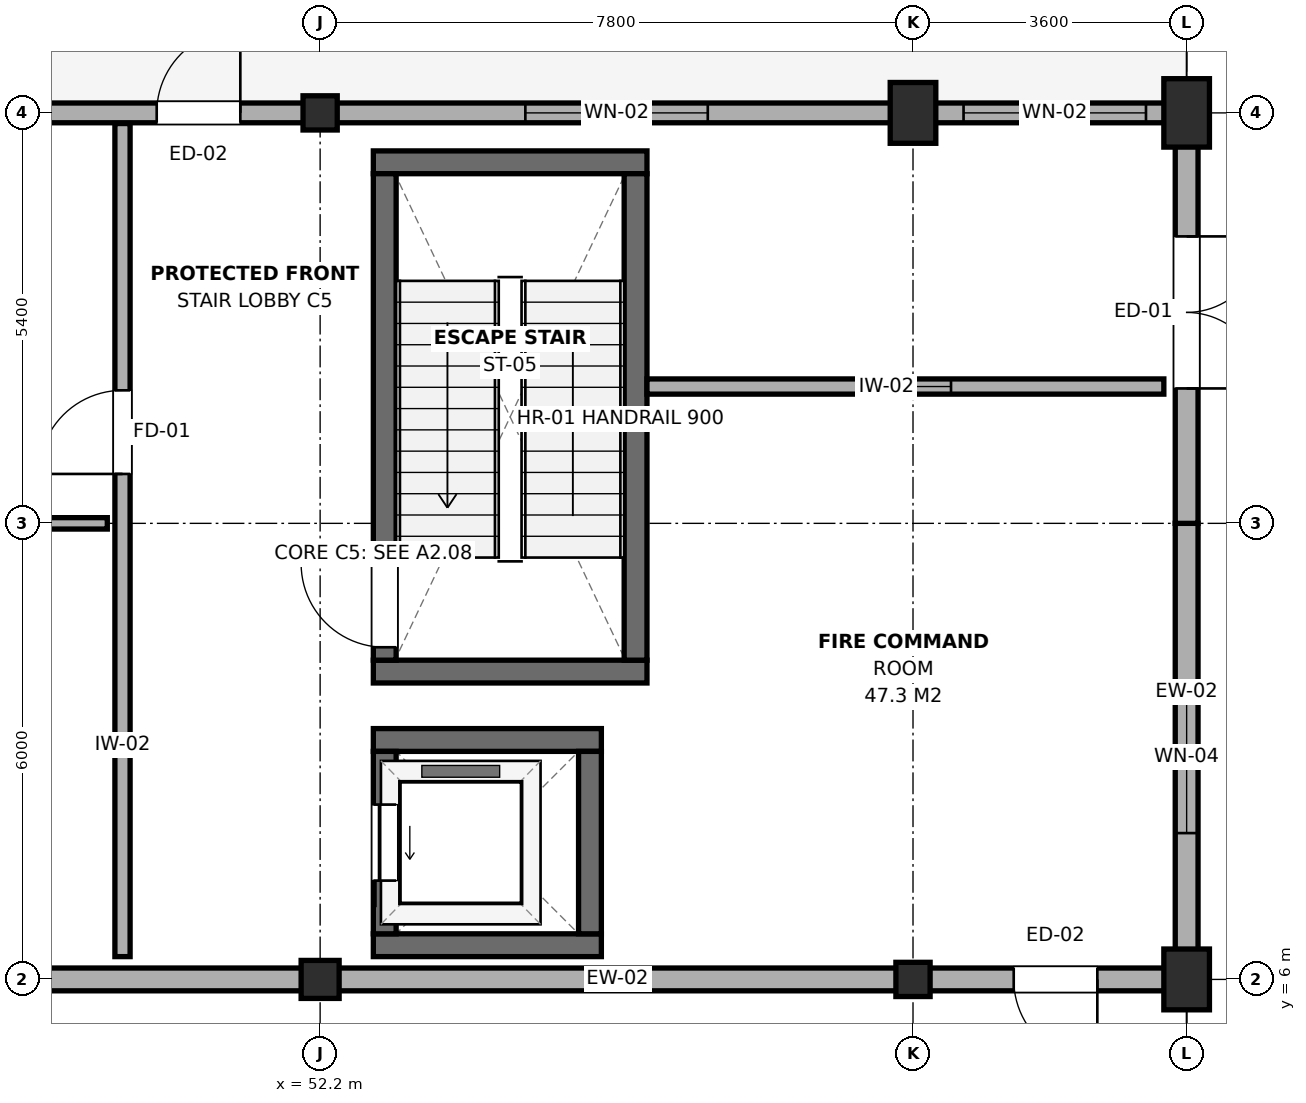
"""IFC4 building model, lengths in metres.
Left out: names, types, materials, properties, quantities, classifications, styles, units other than length and angle.
Written with IfcOpenShell. Run it as: python <this file> out.ifc"""

import sys

from ifc_helpers import new_model, si_unit, direction, frame, frame_2d, origin, origin_2d, place, context, subcontext, project, spatial, rectangle, extrude, element, fill, save


model = new_model("IFC4")
c1 = context("Model", 3, precision=1e-05, world=origin(), true_north=direction((0.0, 1.0)))
c2 = subcontext(c1, "Body", "Model", "MODEL_VIEW")
j1 = project(units=[si_unit("LENGTHUNIT", "METRE"), si_unit("PLANEANGLEUNIT", "RADIAN")], contexts=[c1])
p1 = place(None, origin())
s1 = spatial("IfcSite", under=j1, at=p1, CompositionType="ELEMENT")
p2 = place(p1, origin())
s2 = spatial("IfcBuilding", under=s1, at=p2, CompositionType="ELEMENT")
p3 = place(p2, origin())
s3 = spatial("IfcBuildingStorey", under=s2, at=p3, CompositionType="ELEMENT", Elevation=0.0)
p4 = place(p3, frame((52.2, 6.0, 0.0), z_axis=(0.0, 0.0, 1.0), x_axis=(1.0, 0.0, 0.0)))
e1 = element("IfcColumn", 1, at=p4, inside=s3, PredefinedType="COLUMN", context=c2, shape_type="SweptSolid", body=[
    extrude(rectangle(XDim=0.5, YDim=0.5, at=origin_2d()), origin(), (0.0, 0.0, 1.0), 4.8),
])
for number, where, z_axis, x_axis in (
    (2, (52.2, 17.4, 0.0), (0.0, 0.0, 1.0), (1.0, 0.0, 0.0)),
    (3, (60.0, 6.0, 0.0), (0.0, 0.0, 1.0), (1.0, 0.0, 0.0)),
):
    element("IfcColumn", number, at=place(p3, frame(where, z_axis=z_axis, x_axis=x_axis)), inside=s3, PredefinedType="COLUMN", context=c2, shape_type="SweptSolid", body=[
        extrude(rectangle(XDim=0.45, YDim=0.45, at=origin_2d()), origin(), (0.0, 0.0, 1.0), 4.8),
    ])
for number, where, z_axis, x_axis in (
    (4, (60.0, 17.4, 0.0), (0.0, 0.0, 1.0), (1.0, 0.0, 0.0)),
    (5, (63.6, 6.0, 0.0), (0.0, 0.0, 1.0), (1.0, 0.0, 0.0)),
):
    element("IfcColumn", number, at=place(p3, frame(where, z_axis=z_axis, x_axis=x_axis)), inside=s3, PredefinedType="COLUMN", context=c2, shape_type="SweptSolid", body=[
        extrude(rectangle(XDim=0.6, YDim=0.8, at=origin_2d()), origin(), (0.0, 0.0, 1.0), 4.8),
    ])
p5 = place(p3, frame((63.6, 17.4, 0.0), z_axis=(0.0, 0.0, 1.0), x_axis=(1.0, 0.0, 0.0)))
e6 = element("IfcColumn", 6, at=p5, inside=s3, PredefinedType="COLUMN", context=c2, shape_type="SweptSolid", body=[
    extrude(rectangle(XDim=0.6, YDim=0.9, at=origin_2d()), origin(), (0.0, 0.0, 1.0), 4.8),
])
for number, where, z_axis, x_axis in (
    (7, (52.9, 10.05, 0.0), (0.0, 0.0, 1.0), (1.0, 0.0, 0.0)),
    (8, (52.9, 16.75, 0.0), (0.0, 0.0, 1.0), (1.0, 0.0, 0.0)),
):
    element("IfcWall", number, at=place(p3, frame(where, z_axis=z_axis, x_axis=x_axis)), inside=s3, PredefinedType="SHEAR", context=c2, shape_type="SweptSolid", body=[
        extrude(rectangle(XDim=3.6, YDim=0.3, at=frame_2d((1.8, 0.0))), origin(), (0.0, 0.0, 1.0), 4.56),
    ])
p6 = place(p3, frame((53.05, 10.2, 0.0), z_axis=(0.0, 0.0, 1.0), x_axis=(0.0, 1.0, 0.0)))
e9 = element("IfcWall", 9, at=p6, inside=s3, PredefinedType="SHEAR", context=c2, shape_type="SweptSolid", body=[
    extrude(rectangle(XDim=6.4, YDim=0.3, at=frame_2d((3.2, 0.0))), origin(), (0.0, 0.0, 1.0), 4.56),
])
p7 = place(p6, frame((0.17, 0.0, 0.0)))
e10 = element("IfcOpeningElement", 10, at=p7, cuts=e9, PredefinedType="OPENING", context=c2, shape_type="SweptSolid", body=[
    extrude(rectangle(XDim=1.1, YDim=2.15, at=frame_2d((0.55, 1.075))), frame((0.0, 0.165, 0.0), z_axis=(0.0, -1.0, 0.0), x_axis=(1.0, 0.0, 0.0)), (0.0, 0.0, 1.0), 0.33),
])
p8 = place(p3, frame((56.35, 10.2, 0.0), z_axis=(0.0, 0.0, 1.0), x_axis=(0.0, 1.0, 0.0)))
e11 = element("IfcWall", 11, at=p8, inside=s3, PredefinedType="SHEAR", context=c2, shape_type="SweptSolid", body=[
    extrude(rectangle(XDim=6.4, YDim=0.3, at=frame_2d((3.2, 0.0))), origin(), (0.0, 0.0, 1.0), 4.56),
])
for number, where, z_axis, x_axis in (
    (12, (52.9, 6.45, 0.0), (0.0, 0.0, 1.0), (1.0, 0.0, 0.0)),
    (13, (52.9, 9.15, 0.0), (0.0, 0.0, 1.0), (1.0, 0.0, 0.0)),
):
    element("IfcWall", number, at=place(p3, frame(where, z_axis=z_axis, x_axis=x_axis)), inside=s3, PredefinedType="SHEAR", context=c2, shape_type="SweptSolid", body=[
        extrude(rectangle(XDim=3.0, YDim=0.3, at=frame_2d((1.5, 0.0))), origin(), (0.0, 0.0, 1.0), 4.56),
    ])
p9 = place(p3, frame((53.05, 6.6, 0.0), z_axis=(0.0, 0.0, 1.0), x_axis=(0.0, 1.0, 0.0)))
e14 = element("IfcWall", 14, at=p9, inside=s3, PredefinedType="SHEAR", context=c2, shape_type="SweptSolid", body=[
    extrude(rectangle(XDim=2.4, YDim=0.3, at=frame_2d((1.2, 0.0))), origin(), (0.0, 0.0, 1.0), 4.56),
])
p10 = place(p9, frame((0.7, 0.0, 0.0)))
e15 = element("IfcOpeningElement", 15, at=p10, cuts=e14, PredefinedType="OPENING", context=c2, shape_type="SweptSolid", body=[
    extrude(rectangle(XDim=1.0, YDim=2.15, at=frame_2d((0.5, 1.075))), frame((0.0, 0.165, 0.0), z_axis=(0.0, -1.0, 0.0), x_axis=(1.0, 0.0, 0.0)), (0.0, 0.0, 1.0), 0.33),
])
p11 = place(p3, frame((55.75, 6.6, 0.0), z_axis=(0.0, 0.0, 1.0), x_axis=(0.0, 1.0, 0.0)))
e16 = element("IfcWall", 16, at=p11, inside=s3, PredefinedType="SHEAR", context=c2, shape_type="SweptSolid", body=[
    extrude(rectangle(XDim=2.4, YDim=0.3, at=frame_2d((1.2, 0.0))), origin(), (0.0, 0.0, 1.0), 4.56),
])
p12 = place(p3, frame((46.2, 6.0, 0.0), z_axis=(0.0, 0.0, 1.0), x_axis=(1.0, 0.0, 0.0)))
e17 = element("IfcWall", 17, at=p12, inside=s3, PredefinedType="SOLIDWALL", context=c2, shape_type="SweptSolid", body=[
    extrude(rectangle(XDim=6.0, YDim=0.3, at=frame_2d((3.0, 0.0))), origin(), (0.0, 0.0, 1.0), 3.955),
])
p13 = place(p3, frame((52.2, 6.0, 0.0), z_axis=(0.0, 0.0, 1.0), x_axis=(1.0, 0.0, 0.0)))
e18 = element("IfcWall", 18, at=p13, inside=s3, PredefinedType="SOLIDWALL", context=c2, shape_type="SweptSolid", body=[
    extrude(rectangle(XDim=7.8, YDim=0.3, at=frame_2d((3.9, 0.0))), origin(), (0.0, 0.0, 1.0), 3.955),
])
p14 = place(p3, frame((60.0, 6.0, 0.0), z_axis=(0.0, 0.0, 1.0), x_axis=(1.0, 0.0, 0.0)))
e19 = element("IfcWall", 19, at=p14, inside=s3, PredefinedType="SOLIDWALL", context=c2, shape_type="SweptSolid", body=[
    extrude(rectangle(XDim=3.75, YDim=0.3, at=frame_2d((1.875, 0.0))), origin(), (0.0, 0.0, 1.0), 3.955),
])
p15 = place(p14, frame((1.325, 0.0, 0.0)))
e20 = element("IfcOpeningElement", 20, at=p15, cuts=e19, PredefinedType="OPENING", context=c2, shape_type="SweptSolid", body=[
    extrude(rectangle(XDim=1.1, YDim=2.2, at=frame_2d((0.55, 1.1))), frame((0.0, 0.165, 0.0), z_axis=(0.0, -1.0, 0.0), x_axis=(1.0, 0.0, 0.0)), (0.0, 0.0, 1.0), 0.33),
])
p16 = place(p3, frame((63.6, 5.85, 0.0), z_axis=(0.0, 0.0, 1.0), x_axis=(0.0, 1.0, 0.0)))
e21 = element("IfcWall", 21, at=p16, inside=s3, PredefinedType="SOLIDWALL", context=c2, shape_type="SweptSolid", body=[
    extrude(rectangle(XDim=6.15, YDim=0.3, at=frame_2d((3.075, 0.0))), origin(), (0.0, 0.0, 1.0), 3.965),
])
p17 = place(p16, frame((2.075, 0.0, 0.9)))
e22 = element("IfcOpeningElement", 22, at=p17, cuts=e21, PredefinedType="OPENING", context=c2, shape_type="SweptSolid", body=[
    extrude(rectangle(XDim=2.0, YDim=1.8, at=frame_2d((1.0, 0.9))), frame((0.0, 0.165, 0.0), z_axis=(0.0, -1.0, 0.0), x_axis=(1.0, 0.0, 0.0)), (0.0, 0.0, 1.0), 0.33),
])
p18 = place(p3, frame((63.6, 12.0, 0.0), z_axis=(0.0, 0.0, 1.0), x_axis=(0.0, 1.0, 0.0)))
e23 = element("IfcWall", 23, at=p18, inside=s3, PredefinedType="SOLIDWALL", context=c2, shape_type="SweptSolid", body=[
    extrude(rectangle(XDim=5.55, YDim=0.3, at=frame_2d((2.775, 0.0))), origin(), (0.0, 0.0, 1.0), 3.965),
])
p19 = place(p18, frame((1.775, 0.0, 0.0)))
e24 = element("IfcOpeningElement", 24, at=p19, cuts=e23, PredefinedType="OPENING", context=c2, shape_type="SweptSolid", body=[
    extrude(rectangle(XDim=2.0, YDim=2.25, at=frame_2d((1.0, 1.125))), frame((0.0, 0.165, 0.0), z_axis=(0.0, -1.0, 0.0), x_axis=(1.0, 0.0, 0.0)), (0.0, 0.0, 1.0), 0.33),
])
p20 = place(p3, frame((46.2, 17.4, 0.0), z_axis=(0.0, 0.0, 1.0), x_axis=(1.0, 0.0, 0.0)))
e25 = element("IfcWall", 25, at=p20, inside=s3, PredefinedType="SOLIDWALL", context=c2, shape_type="SweptSolid", body=[
    extrude(rectangle(XDim=6.0, YDim=0.26, at=frame_2d((3.0, 0.0))), origin(), (0.0, 0.0, 1.0), 4.105),
])
p21 = place(p20, frame((3.85, 0.0, 0.0)))
e26 = element("IfcOpeningElement", 26, at=p21, cuts=e25, PredefinedType="OPENING", context=c2, shape_type="SweptSolid", body=[
    extrude(rectangle(XDim=1.1, YDim=2.2, at=frame_2d((0.55, 1.1))), frame((0.0, 0.145, 0.0), z_axis=(0.0, -1.0, 0.0), x_axis=(1.0, 0.0, 0.0)), (0.0, 0.0, 1.0), 0.29),
])
p22 = place(p3, frame((52.2, 17.4, 0.0), z_axis=(0.0, 0.0, 1.0), x_axis=(1.0, 0.0, 0.0)))
e27 = element("IfcWall", 27, at=p22, inside=s3, PredefinedType="SOLIDWALL", context=c2, shape_type="SweptSolid", body=[
    extrude(rectangle(XDim=7.8, YDim=0.26, at=frame_2d((3.9, 0.0))), origin(), (0.0, 0.0, 1.0), 4.105),
])
p23 = place(p22, frame((2.7, 0.0, 0.9)))
e28 = element("IfcOpeningElement", 28, at=p23, cuts=e27, PredefinedType="OPENING", context=c2, shape_type="SweptSolid", body=[
    extrude(rectangle(XDim=2.4, YDim=2.1, at=frame_2d((1.2, 1.05))), frame((0.0, 0.145, 0.0), z_axis=(0.0, -1.0, 0.0), x_axis=(1.0, 0.0, 0.0)), (0.0, 0.0, 1.0), 0.29),
])
p24 = place(p3, frame((60.0, 17.4, 0.0), z_axis=(0.0, 0.0, 1.0), x_axis=(1.0, 0.0, 0.0)))
e29 = element("IfcWall", 29, at=p24, inside=s3, PredefinedType="SOLIDWALL", context=c2, shape_type="SweptSolid", body=[
    extrude(rectangle(XDim=3.73, YDim=0.26, at=frame_2d((1.865, 0.0))), origin(), (0.0, 0.0, 1.0), 4.205),
])
p25 = place(p24, frame((0.665, 0.0, 0.9)))
e30 = element("IfcOpeningElement", 30, at=p25, cuts=e29, PredefinedType="OPENING", context=c2, shape_type="SweptSolid", body=[
    extrude(rectangle(XDim=2.4, YDim=2.1, at=frame_2d((1.2, 1.05))), frame((0.0, 0.145, 0.0), z_axis=(0.0, -1.0, 0.0), x_axis=(1.0, 0.0, 0.0)), (0.0, 0.0, 1.0), 0.29),
])
p26 = place(p3, frame((49.6, 6.3, 0.0), z_axis=(0.0, 0.0, 1.0), x_axis=(0.0, 1.0, 0.0)))
e31 = element("IfcWall", 31, at=p26, inside=s3, PredefinedType="PARTITIONING", context=c2, shape_type="SweptSolid", body=[
    extrude(rectangle(XDim=10.96, YDim=0.2, at=frame_2d((5.48, 0.0))), origin(), (0.0, 0.0, 1.0), 4.105),
])
p27 = place(p26, frame((6.35, 0.0, 0.0)))
e32 = element("IfcOpeningElement", 32, at=p27, cuts=e31, PredefinedType="OPENING", context=c2, shape_type="SweptSolid", body=[
    extrude(rectangle(XDim=1.1, YDim=2.15, at=frame_2d((0.55, 1.075))), frame((0.0, 0.115, 0.0), z_axis=(0.0, -1.0, 0.0), x_axis=(1.0, 0.0, 0.0)), (0.0, 0.0, 1.0), 0.23),
])
p28 = place(p3, frame((34.2, 12.0, 0.0), z_axis=(0.0, 0.0, 1.0), x_axis=(1.0, 0.0, 0.0)))
e33 = element("IfcWall", 33, at=p28, inside=s3, PredefinedType="PARTITIONING", context=c2, shape_type="SweptSolid", body=[
    extrude(rectangle(XDim=15.2, YDim=0.15, at=frame_2d((7.6, 0.0))), origin(), (0.0, 0.0, 1.0), 3.865),
])
p29 = place(p28, frame((6.8, 0.0, 0.0)))
e34 = element("IfcOpeningElement", 34, at=p29, cuts=e33, PredefinedType="OPENING", context=c2, shape_type="SweptSolid", body=[
    extrude(rectangle(XDim=1.6, YDim=2.15, at=frame_2d((0.8, 1.075))), frame((0.0, 0.09, 0.0), z_axis=(0.0, -1.0, 0.0), x_axis=(1.0, 0.0, 0.0)), (0.0, 0.0, 1.0), 0.18),
])
p30 = place(p28, frame((9.644, 0.0, 0.95)))
e35 = element("IfcOpeningElement", 35, at=p30, cuts=e33, PredefinedType="OPENING", context=c2, shape_type="SweptSolid", body=[
    extrude(rectangle(XDim=2.6, YDim=1.5, at=frame_2d((1.3, 0.75))), frame((0.0, 0.09, 0.0), z_axis=(0.0, -1.0, 0.0), x_axis=(1.0, 0.0, 0.0)), (0.0, 0.0, 1.0), 0.18),
])
p31 = place(p3, frame((56.5, 13.8, 0.0), z_axis=(0.0, 0.0, 1.0), x_axis=(1.0, 0.0, 0.0)))
e36 = element("IfcWall", 36, at=p31, inside=s3, PredefinedType="PARTITIONING", context=c2, shape_type="SweptSolid", body=[
    extrude(rectangle(XDim=6.8, YDim=0.2, at=frame_2d((3.4, 0.0))), origin(), (0.0, 0.0, 1.0), 4.055),
])
p32 = place(p31, frame((2.8, 0.0, 0.95)))
e37 = element("IfcOpeningElement", 37, at=p32, cuts=e36, PredefinedType="OPENING", context=c2, shape_type="SweptSolid", body=[
    extrude(rectangle(XDim=1.2, YDim=1.5, at=frame_2d((0.6, 0.75))), frame((0.0, 0.115, 0.0), z_axis=(0.0, -1.0, 0.0), x_axis=(1.0, 0.0, 0.0)), (0.0, 0.0, 1.0), 0.23),
])
p33 = place(p15, frame((1.1, 0.0, 0.0), z_axis=(0.0, 0.0, 1.0), x_axis=(-1.0, 0.0, 0.0)))
e38 = element("IfcDoor", 38, at=p33, inside=s3, OperationType="SINGLE_SWING_LEFT", PredefinedType="DOOR", context=c2, shape_type="SweptSolid", body=[
    extrude(rectangle(XDim=1.1, YDim=2.2, at=frame_2d((0.55, 1.1))), frame((0.0, 0.025, 0.0), z_axis=(0.0, -1.0, 0.0), x_axis=(1.0, 0.0, 0.0)), (0.0, 0.0, 1.0), 0.05),
])
fill(e20, e38)
p34 = place(p17, origin())
e39 = element("IfcWindow", 39, at=p34, inside=s3, PartitioningType="SINGLE_PANEL", PredefinedType="WINDOW", context=c2, shape_type="SweptSolid", body=[
    extrude(rectangle(XDim=2.0, YDim=1.8, at=frame_2d((1.0, 0.9))), frame((0.0, 0.03, 0.0), z_axis=(0.0, -1.0, 0.0), x_axis=(1.0, 0.0, 0.0)), (0.0, 0.0, 1.0), 0.06),
])
fill(e22, e39)
p35 = place(p19, frame((2.0, 0.0, 0.0), z_axis=(0.0, 0.0, 1.0), x_axis=(-1.0, 0.0, 0.0)))
e40 = element("IfcDoor", 40, at=p35, inside=s3, OperationType="DOUBLE_DOOR_SINGLE_SWING", PredefinedType="DOOR", context=c2, shape_type="SweptSolid", body=[
    extrude(rectangle(XDim=2.0, YDim=2.25, at=frame_2d((1.0, 1.125))), frame((0.0, 0.025, 0.0), z_axis=(0.0, -1.0, 0.0), x_axis=(1.0, 0.0, 0.0)), (0.0, 0.0, 1.0), 0.05),
])
fill(e24, e40)
p36 = place(p21, origin())
e41 = element("IfcDoor", 41, at=p36, inside=s3, OperationType="SINGLE_SWING_RIGHT", PredefinedType="DOOR", context=c2, shape_type="SweptSolid", body=[
    extrude(rectangle(XDim=1.1, YDim=2.2, at=frame_2d((0.55, 1.1))), frame((0.0, 0.025, 0.0), z_axis=(0.0, -1.0, 0.0), x_axis=(1.0, 0.0, 0.0)), (0.0, 0.0, 1.0), 0.05),
])
fill(e26, e41)
p37 = place(p23, origin())
e42 = element("IfcWindow", 42, at=p37, inside=s3, PartitioningType="SINGLE_PANEL", PredefinedType="WINDOW", context=c2, shape_type="SweptSolid", body=[
    extrude(rectangle(XDim=2.4, YDim=2.1, at=frame_2d((1.2, 1.05))), frame((0.0, 0.03, 0.0), z_axis=(0.0, -1.0, 0.0), x_axis=(1.0, 0.0, 0.0)), (0.0, 0.0, 1.0), 0.06),
])
fill(e28, e42)
p38 = place(p25, origin())
e43 = element("IfcWindow", 43, at=p38, inside=s3, PartitioningType="SINGLE_PANEL", PredefinedType="WINDOW", context=c2, shape_type="SweptSolid", body=[
    extrude(rectangle(XDim=2.4, YDim=2.1, at=frame_2d((1.2, 1.05))), frame((0.0, 0.03, 0.0), z_axis=(0.0, -1.0, 0.0), x_axis=(1.0, 0.0, 0.0)), (0.0, 0.0, 1.0), 0.06),
])
fill(e30, e43)
p39 = place(p7, origin())
e44 = element("IfcDoor", 44, at=p39, inside=s3, OperationType="SINGLE_SWING_RIGHT", PredefinedType="DOOR", context=c2, shape_type="SweptSolid", body=[
    extrude(rectangle(XDim=1.1, YDim=2.15, at=frame_2d((0.55, 1.075))), frame((0.0, 0.025, 0.0), z_axis=(0.0, -1.0, 0.0), x_axis=(1.0, 0.0, 0.0)), (0.0, 0.0, 1.0), 0.05),
])
fill(e10, e44)
p40 = place(p10, origin())
e45 = element("IfcDoor", 45, at=p40, inside=s3, OperationType="SLIDING_TO_LEFT", PredefinedType="DOOR", context=c2, shape_type="SweptSolid", body=[
    extrude(rectangle(XDim=1.0, YDim=2.15, at=frame_2d((0.5, 1.075))), frame((0.0, 0.025, 0.0), z_axis=(0.0, -1.0, 0.0), x_axis=(1.0, 0.0, 0.0)), (0.0, 0.0, 1.0), 0.05),
])
fill(e15, e45)
p41 = place(p27, origin())
e46 = element("IfcDoor", 46, at=p41, inside=s3, OperationType="SINGLE_SWING_LEFT", PredefinedType="DOOR", context=c2, shape_type="SweptSolid", body=[
    extrude(rectangle(XDim=1.1, YDim=2.15, at=frame_2d((0.55, 1.075))), frame((0.0, 0.025, 0.0), z_axis=(0.0, -1.0, 0.0), x_axis=(1.0, 0.0, 0.0)), (0.0, 0.0, 1.0), 0.05),
])
fill(e32, e46)
p42 = place(p32, origin())
e47 = element("IfcWindow", 47, at=p42, inside=s3, PartitioningType="SINGLE_PANEL", PredefinedType="WINDOW", context=c2, shape_type="SweptSolid", body=[
    extrude(rectangle(XDim=1.2, YDim=1.5, at=frame_2d((0.6, 0.75))), frame((0.0, 0.03, 0.0), z_axis=(0.0, -1.0, 0.0), x_axis=(1.0, 0.0, 0.0)), (0.0, 0.0, 1.0), 0.06),
])
fill(e37, e47)
save(model, sys.argv[1])
